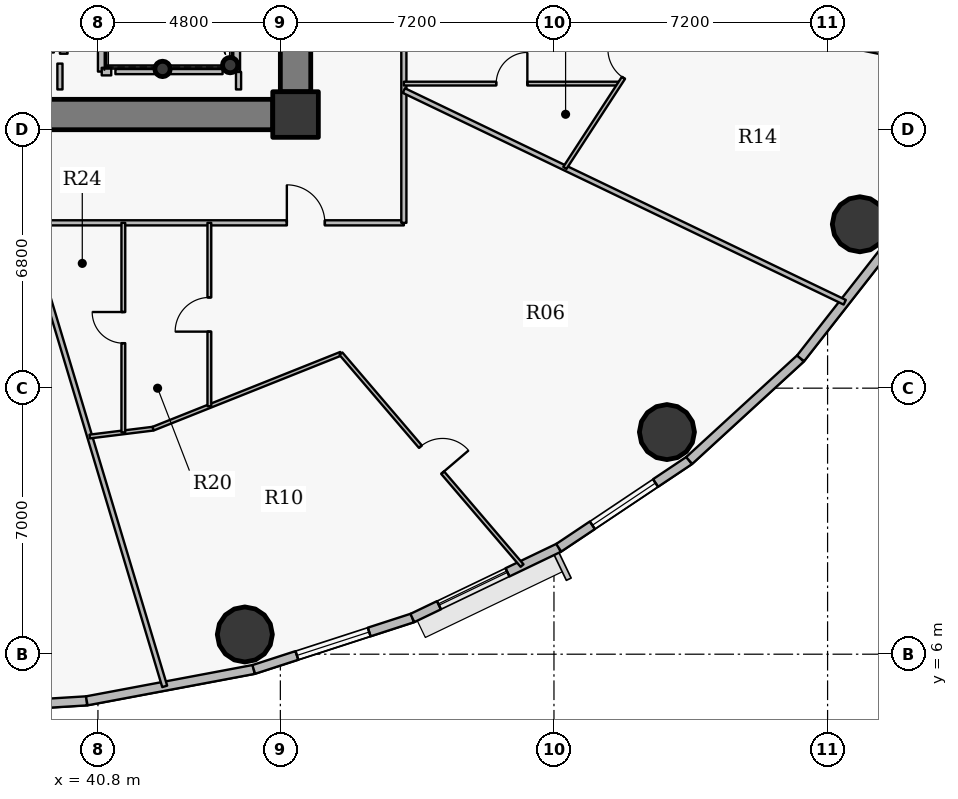
"""IFC4 building model, lengths in metres.
Left out: names, types, materials, properties, quantities, classifications, styles, units other than length and angle.
Written with IfcOpenShell. Run it as: python <this file> out.ifc"""

import sys

from ifc_helpers import new_model, si_unit, direction, frame, frame_2d, origin, origin_2d, place, context, subcontext, project, spatial, rectangle, hollow_circle, extrude, source, transform, mapped, element, fill, save


model = new_model("IFC4")
c1 = context("Model", 3, precision=1e-05, world=origin(), true_north=direction((0.0, 1.0)))
c2 = subcontext(c1, "Body", "Model", "MODEL_VIEW")
j1 = project(units=[si_unit("LENGTHUNIT", "METRE"), si_unit("PLANEANGLEUNIT", "RADIAN")], contexts=[c1])
p1 = place(None, origin())
s1 = spatial("IfcSite", under=j1, at=p1, CompositionType="ELEMENT")
p2 = place(p1, origin())
s2 = spatial("IfcBuilding", under=s1, at=p2, CompositionType="ELEMENT")
p3 = place(p2, frame((0.0, 0.0, 100.95)))
s3 = spatial("IfcBuildingStorey", under=s2, at=p3, CompositionType="ELEMENT", Elevation=100.95)
p4 = place(p3, frame((46.0, 20.2, 0.0), z_axis=(0.0, 0.0, 1.0), x_axis=(1.0, 0.0, 0.0)))
e1 = element("IfcColumn", 1, at=p4, inside=s3, PredefinedType="COLUMN", context=c2, shape_type="SweptSolid", body=[
    extrude(rectangle(XDim=1.2, YDim=1.2, at=origin_2d()), origin(), (0.0, 0.0, 1.0), 3.75),
])
for number, where, z_axis, x_axis in (
    (2, (44.28, 21.5, 0.0), (0.0, 0.0, 1.0), (1.0, 0.0, 0.0)),
    (3, (42.5, 21.4, 0.0), (0.0, 0.0, 1.0), (1.0, 0.0, 0.0)),
):
    element("IfcColumn", number, at=place(p3, frame(where, z_axis=z_axis, x_axis=x_axis)), inside=s3, PredefinedType="COLUMN", context=c2, shape_type="SweptSolid", body=[
        extrude(hollow_circle(Radius=0.203, WallThickness=0.016, at=origin_2d()), origin(), (0.0, 0.0, 1.0), 3.75),
    ])
p5 = place(p3, frame((46.0, 33.2, 0.0), z_axis=(0.0, 0.0, 1.0), x_axis=(0.0, -1.0, 0.0)))
e4 = element("IfcWall", 4, at=p5, inside=s3, PredefinedType="SHEAR", context=c2, shape_type="SweptSolid", body=[
    extrude(rectangle(XDim=12.4, YDim=0.8, at=frame_2d((6.2, 0.0))), origin(), (0.0, 0.0, 1.0), 2.95),
])
p6 = place(p5, frame((5.79, 0.0, 0.0)))
e5 = element("IfcOpeningElement", 5, at=p6, cuts=e4, PredefinedType="OPENING", context=c2, shape_type="SweptSolid", body=[
    extrude(rectangle(XDim=0.82, YDim=2.1, at=origin_2d()), frame((0.41, 0.41, 1.05), z_axis=(0.0, -1.0, 0.0), x_axis=(1.0, 0.0, 0.0)), (0.0, 0.0, 1.0), 0.82),
])
p7 = place(p3, frame((45.4, 20.2, 0.0), z_axis=(0.0, 0.0, 1.0), x_axis=(-1.0, 0.0, 0.0)))
e6 = element("IfcWall", 6, at=p7, inside=s3, PredefinedType="SHEAR", context=c2, shape_type="SweptSolid", body=[
    extrude(rectangle(XDim=18.8, YDim=0.8, at=frame_2d((9.4, 0.0))), origin(), (0.0, 0.0, 1.0), 2.95),
])
p8 = place(p7, frame((10.15, 0.0, 0.0)))
e7 = element("IfcOpeningElement", 7, at=p8, cuts=e6, PredefinedType="OPENING", context=c2, shape_type="SweptSolid", body=[
    extrude(rectangle(XDim=1.15, YDim=2.15, at=origin_2d()), frame((0.575, 0.41, 1.075), z_axis=(0.0, -1.0, 0.0), x_axis=(1.0, 0.0, 0.0)), (0.0, 0.0, 1.0), 0.82),
])
for number, where, z_axis, x_axis in (
    (8, (44.666, 6.519, 0.0), (0.0, 0.0, 1.0), (1.0, 0.0, 0.0)),
    (9, (55.773, 11.844, 0.0), (0.0, 0.0, 1.0), (1.0, 0.0, 0.0)),
    (10, (60.849, 17.312, 0.0), (0.0, 0.0, 1.0), (1.0, 0.0, 0.0)),
):
    element("IfcColumn", number, at=place(p3, frame(where, z_axis=z_axis, x_axis=x_axis)), inside=s3, PredefinedType="COLUMN", context=c2, shape_type="SweptSolid", body=[
        extrude(hollow_circle(Radius=0.725, WallThickness=0.042, at=origin_2d()), origin(), (0.0, 0.0, 1.0), 3.75),
    ])
p9 = place(p3, frame((40.506, 4.773, 0.0), z_axis=(0.0, 0.0, 1.0), x_axis=(-0.998107531589, -0.061492726276, 0.0)))
e11 = element("IfcWall", 11, at=p9, inside=s3, PredefinedType="SOLIDWALL", context=c2, shape_type="SweptSolid", body=[
    extrude(rectangle(XDim=4.514, YDim=0.24, at=frame_2d((2.257, 0.0))), origin(), (0.0, 0.0, 1.0), 3.5),
])
p10 = place(p9, frame((1.257, 0.0, 0.9)))
e12 = element("IfcOpeningElement", 12, at=p10, cuts=e11, PredefinedType="OPENING", context=c2, shape_type="SweptSolid", body=[
    extrude(rectangle(XDim=2.0, YDim=1.75, at=origin_2d()), frame((1.0, 0.13, 0.875), z_axis=(0.0, -1.0, 0.0), x_axis=(1.0, 0.0, 0.0)), (0.0, 0.0, 1.0), 0.26),
])
p11 = place(p3, frame((44.9, 5.599, 0.0), z_axis=(0.0, 0.0, 1.0), x_axis=(-0.982789252177, -0.184730305596, 0.0)))
e13 = element("IfcWall", 13, at=p11, inside=s3, PredefinedType="SOLIDWALL", context=c2, shape_type="SweptSolid", body=[
    extrude(rectangle(XDim=4.471, YDim=0.24, at=frame_2d((2.235, 0.0))), origin(), (0.0, 0.0, 1.0), 3.5),
])
p12 = place(p3, frame((49.074, 6.953, 0.0), z_axis=(0.0, 0.0, 1.0), x_axis=(-0.951211346073, -0.308540070495, 0.0)))
e14 = element("IfcWall", 14, at=p12, inside=s3, PredefinedType="SOLIDWALL", context=c2, shape_type="SweptSolid", body=[
    extrude(rectangle(XDim=4.388, YDim=0.24, at=frame_2d((2.194, 0.0))), origin(), (0.0, 0.0, 1.0), 3.5),
])
p13 = place(p12, frame((1.194, 0.0, 0.9)))
e15 = element("IfcOpeningElement", 15, at=p13, cuts=e14, PredefinedType="OPENING", context=c2, shape_type="SweptSolid", body=[
    extrude(rectangle(XDim=2.0, YDim=1.75, at=origin_2d()), frame((1.0, 0.13, 0.875), z_axis=(0.0, -1.0, 0.0), x_axis=(1.0, 0.0, 0.0)), (0.0, 0.0, 1.0), 0.26),
])
p14 = place(p3, frame((52.925, 8.801, 0.0), z_axis=(0.0, 0.0, 1.0), x_axis=(-0.901589935876, -0.432591709962, 0.0)))
e16 = element("IfcWall", 16, at=p14, inside=s3, PredefinedType="SOLIDWALL", context=c2, shape_type="SweptSolid", body=[
    extrude(rectangle(XDim=4.272, YDim=0.24, at=frame_2d((2.136, 0.0))), origin(), (0.0, 0.0, 1.0), 3.5),
])
p15 = place(p14, frame((1.495, 0.0, 0.9)))
e17 = element("IfcOpeningElement", 17, at=p15, cuts=e16, PredefinedType="OPENING", context=c2, shape_type="SweptSolid", body=[
    extrude(rectangle(XDim=2.0, YDim=1.75, at=origin_2d()), frame((1.0, 0.13, 0.875), z_axis=(0.0, -1.0, 0.0), x_axis=(1.0, 0.0, 0.0)), (0.0, 0.0, 1.0), 0.26),
])
p16 = place(p3, frame((56.358, 11.097, 0.0), z_axis=(0.0, 0.0, 1.0), x_axis=(-0.831221811447, -0.555940914284, 0.0)))
e18 = element("IfcWall", 18, at=p16, inside=s3, PredefinedType="SOLIDWALL", context=c2, shape_type="SweptSolid", body=[
    extrude(rectangle(XDim=4.13, YDim=0.24, at=frame_2d((2.065, 0.0))), origin(), (0.0, 0.0, 1.0), 3.5),
])
p17 = place(p16, frame((1.065, 0.0, 0.9)))
e19 = element("IfcOpeningElement", 19, at=p17, cuts=e18, PredefinedType="OPENING", context=c2, shape_type="SweptSolid", body=[
    extrude(rectangle(XDim=2.0, YDim=1.75, at=origin_2d()), frame((1.0, 0.13, 0.875), z_axis=(0.0, -1.0, 0.0), x_axis=(1.0, 0.0, 0.0)), (0.0, 0.0, 1.0), 0.26),
])
p18 = place(p3, frame((59.289, 13.783, 0.0), z_axis=(0.0, 0.0, 1.0), x_axis=(-0.737113356241, -0.675769117414, 0.0)))
e20 = element("IfcWall", 20, at=p18, inside=s3, PredefinedType="SOLIDWALL", context=c2, shape_type="SweptSolid", body=[
    extrude(rectangle(XDim=3.976, YDim=0.24, at=frame_2d((1.988, 0.0))), origin(), (0.0, 0.0, 1.0), 3.5),
])
p19 = place(p3, frame((61.645, 16.794, 0.0), z_axis=(0.0, 0.0, 1.0), x_axis=(-0.616272103517, -0.787533297345, 0.0)))
e21 = element("IfcWall", 21, at=p19, inside=s3, PredefinedType="SOLIDWALL", context=c2, shape_type="SweptSolid", body=[
    extrude(rectangle(XDim=3.823, YDim=0.24, at=frame_2d((1.912, 0.0))), origin(), (0.0, 0.0, 1.0), 3.5),
])
p20 = place(p3, frame((34.795, 17.35, 0.0), z_axis=(0.0, 0.0, 1.0), x_axis=(1.0, 0.0, 0.0)))
e22 = element("IfcWall", 22, at=p20, inside=s3, PredefinedType="PARTITIONING", context=c2, shape_type="SweptSolid", body=[
    extrude(rectangle(XDim=14.055, YDim=0.135, at=frame_2d((7.028, 0.0))), origin(), (0.0, 0.0, 1.0), 2.935),
])
p21 = place(p20, frame((1.571, 0.0, 0.0)))
e23 = element("IfcOpeningElement", 23, at=p21, cuts=e22, PredefinedType="OPENING", context=c2, shape_type="SweptSolid", body=[
    extrude(rectangle(XDim=1.0, YDim=2.15, at=origin_2d()), frame((0.5, 0.078, 1.075), z_axis=(0.0, -1.0, 0.0), x_axis=(1.0, 0.0, 0.0)), (0.0, 0.0, 1.0), 0.155),
])
p22 = place(p20, frame((10.976, 0.0, 0.0)))
e24 = element("IfcOpeningElement", 24, at=p22, cuts=e22, PredefinedType="OPENING", context=c2, shape_type="SweptSolid", body=[
    extrude(rectangle(XDim=1.0, YDim=2.15, at=origin_2d()), frame((0.5, 0.078, 1.075), z_axis=(0.0, -1.0, 0.0), x_axis=(1.0, 0.0, 0.0)), (0.0, 0.0, 1.0), 0.155),
])
p23 = place(p3, frame((38.896, 17.35, 0.0), z_axis=(0.0, 0.0, 1.0), x_axis=(0.287463970392, -0.957791452105, 0.0)))
e25 = element("IfcWall", 25, at=p23, inside=s3, PredefinedType="PARTITIONING", context=c2, shape_type="SweptSolid", body=[
    extrude(rectangle(XDim=12.734, YDim=0.135, at=frame_2d((6.367, 0.0))), origin(), (0.0, 0.0, 1.0), 2.935),
])
p24 = place(p3, frame((39.8, 21.9, 0.0), z_axis=(0.0, 0.0, 1.0), x_axis=(1.0, 0.0, 0.0)))
e26 = element("IfcWall", 26, at=p24, inside=s3, PredefinedType="PARTITIONING", context=c2, shape_type="SweptSolid", body=[
    extrude(rectangle(XDim=0.2, YDim=0.2, at=frame_2d((0.1, 0.0))), origin(), (0.0, 0.0, 1.0), 3.5),
])
p25 = place(p3, frame((40.584, 11.728, 0.0), z_axis=(0.0, 0.0, 1.0), x_axis=(0.992400317705, 0.123051247123, 0.0)))
e27 = element("IfcWall", 27, at=p25, inside=s3, PredefinedType="PARTITIONING", context=c2, shape_type="SweptSolid", body=[
    extrude(rectangle(XDim=1.68, YDim=0.1, at=frame_2d((0.84, 0.0))), origin(), (0.0, 0.0, 1.0), 2.935),
])
p26 = place(p3, frame((40.9, 21.33, 0.0), z_axis=(0.0, 0.0, 1.0), x_axis=(0.0, 1.0, 0.0)))
e28 = element("IfcWall", 28, at=p26, inside=s3, PredefinedType="PARTITIONING", context=c2, shape_type="SweptSolid", body=[
    extrude(rectangle(XDim=5.91, YDim=0.2, at=frame_2d((2.955, 0.0))), origin(), (0.0, 0.0, 1.0), 3.035),
])
p27 = place(p3, frame((40.9, 21.33, 0.0), z_axis=(0.0, 0.0, 1.0), x_axis=(1.0, 0.0, 0.0)))
e29 = element("IfcWall", 29, at=p27, inside=s3, PredefinedType="PARTITIONING", context=c2, shape_type="SweptSolid", body=[
    extrude(rectangle(XDim=0.25, YDim=0.2, at=frame_2d((0.125, 0.0))), origin(), (0.0, 0.0, 1.0), 3.035),
])
p28 = place(p3, frame((41.469, 11.837, 0.0), z_axis=(0.0, 0.0, 1.0), x_axis=(0.0, 1.0, 0.0)))
e30 = element("IfcWall", 30, at=p28, inside=s3, PredefinedType="PARTITIONING", context=c2, shape_type="SweptSolid", body=[
    extrude(rectangle(XDim=5.513, YDim=0.1, at=frame_2d((2.756, 0.0))), origin(), (0.0, 0.0, 1.0), 2.935),
])
p29 = place(p28, frame((2.346, 0.0, 0.0)))
e31 = element("IfcOpeningElement", 31, at=p29, cuts=e30, PredefinedType="OPENING", context=c2, shape_type="SweptSolid", body=[
    extrude(rectangle(XDim=0.82, YDim=2.1, at=origin_2d()), frame((0.41, 0.06, 1.05), z_axis=(0.0, -1.0, 0.0), x_axis=(1.0, 0.0, 0.0)), (0.0, 0.0, 1.0), 0.12),
])
p30 = place(p3, frame((42.251, 11.934, 0.0), z_axis=(0.0, 0.0, 1.0), x_axis=(0.928805351872, 0.370567967226, 0.0)))
e32 = element("IfcWall", 32, at=p30, inside=s3, PredefinedType="PARTITIONING", context=c2, shape_type="SweptSolid", body=[
    extrude(rectangle(XDim=5.322, YDim=0.1, at=frame_2d((2.661, 0.0))), origin(), (0.0, 0.0, 1.0), 2.935),
])
p31 = place(p3, frame((43.732, 12.525, 0.0), z_axis=(0.0, 0.0, 1.0), x_axis=(0.0, 1.0, 0.0)))
e33 = element("IfcWall", 33, at=p31, inside=s3, PredefinedType="PARTITIONING", context=c2, shape_type="SweptSolid", body=[
    extrude(rectangle(XDim=4.825, YDim=0.1, at=frame_2d((2.413, 0.0))), origin(), (0.0, 0.0, 1.0), 3.5),
])
p32 = place(p31, frame((1.962, 0.0, 0.0)))
e34 = element("IfcOpeningElement", 34, at=p32, cuts=e33, PredefinedType="OPENING", context=c2, shape_type="SweptSolid", body=[
    extrude(rectangle(XDim=0.9, YDim=2.1, at=origin_2d()), frame((0.45, 0.06, 1.05), z_axis=(0.0, -1.0, 0.0), x_axis=(1.0, 0.0, 0.0)), (0.0, 0.0, 1.0), 0.12),
])
p33 = place(p3, frame((44.44, 21.33, 0.0), z_axis=(0.0, 0.0, 1.0), x_axis=(0.0, 1.0, 0.0)))
e35 = element("IfcWall", 35, at=p33, inside=s3, PredefinedType="PARTITIONING", context=c2, shape_type="SweptSolid", body=[
    extrude(rectangle(XDim=8.52, YDim=0.2, at=frame_2d((4.26, 0.0))), origin(), (0.0, 0.0, 1.0), 3.5),
])
p34 = place(p3, frame((47.195, 13.906, 0.0), z_axis=(0.0, 0.0, 1.0), x_axis=(0.649828611722, -0.76008076899, 0.0)))
e36 = element("IfcWall", 36, at=p34, inside=s3, PredefinedType="PARTITIONING", context=c2, shape_type="SweptSolid", body=[
    extrude(rectangle(XDim=7.334, YDim=0.1, at=frame_2d((3.667, 0.0))), origin(), (0.0, 0.0, 1.0), 2.935),
])
p35 = place(p34, frame((3.217, 0.0, 0.0)))
e37 = element("IfcOpeningElement", 37, at=p35, cuts=e36, PredefinedType="OPENING", context=c2, shape_type="SweptSolid", body=[
    extrude(rectangle(XDim=0.9, YDim=2.1, at=origin_2d()), frame((0.45, 0.06, 1.05), z_axis=(0.0, -1.0, 0.0), x_axis=(1.0, 0.0, 0.0)), (0.0, 0.0, 1.0), 0.12),
])
p36 = place(p3, frame((48.85, 17.35, 0.0), z_axis=(0.0, 0.0, 1.0), x_axis=(0.0, 1.0, 0.0)))
e38 = element("IfcWall", 38, at=p36, inside=s3, PredefinedType="PARTITIONING", context=c2, shape_type="SweptSolid", body=[
    extrude(rectangle(XDim=19.3, YDim=0.135, at=frame_2d((9.65, 0.0))), origin(), (0.0, 0.0, 1.0), 2.935),
])
p37 = place(p36, frame((16.551, 0.0, 0.0)))
e39 = element("IfcOpeningElement", 39, at=p37, cuts=e38, PredefinedType="OPENING", context=c2, shape_type="SweptSolid", body=[
    extrude(rectangle(XDim=1.0, YDim=2.15, at=origin_2d()), frame((0.5, 0.078, 1.075), z_axis=(0.0, -1.0, 0.0), x_axis=(1.0, 0.0, 0.0)), (0.0, 0.0, 1.0), 0.155),
])
p38 = place(p36, frame((8.753, 0.0, 0.0)))
e40 = element("IfcOpeningElement", 40, at=p38, cuts=e38, PredefinedType="OPENING", context=c2, shape_type="SweptSolid", body=[
    extrude(rectangle(XDim=1.0, YDim=2.15, at=origin_2d()), frame((0.5, 0.078, 1.075), z_axis=(0.0, -1.0, 0.0), x_axis=(1.0, 0.0, 0.0)), (0.0, 0.0, 1.0), 0.155),
])
p39 = place(p3, frame((48.85, 20.83, 0.0), z_axis=(0.0, 0.0, 1.0), x_axis=(0.901472427533, -0.432836530803, 0.0)))
e41 = element("IfcWall", 41, at=p39, inside=s3, PredefinedType="PARTITIONING", context=c2, shape_type="SweptSolid", body=[
    extrude(rectangle(XDim=12.869, YDim=0.135, at=frame_2d((6.434, 0.0))), origin(), (0.0, 0.0, 1.0), 2.935),
])
p40 = place(p3, frame((48.85, 21.014, 0.0), z_axis=(0.0, 0.0, 1.0), x_axis=(1.0, 0.0, 0.0)))
e42 = element("IfcWall", 42, at=p40, inside=s3, PredefinedType="PARTITIONING", context=c2, shape_type="SweptSolid", body=[
    extrude(rectangle(XDim=5.68, YDim=0.1, at=frame_2d((2.84, 0.0))), origin(), (0.0, 0.0, 1.0), 2.935),
])
p41 = place(p40, frame((2.43, 0.0, 0.0)))
e43 = element("IfcOpeningElement", 43, at=p41, cuts=e42, PredefinedType="OPENING", context=c2, shape_type="SweptSolid", body=[
    extrude(rectangle(XDim=0.82, YDim=2.1, at=origin_2d()), frame((0.41, 0.06, 1.05), z_axis=(0.0, -1.0, 0.0), x_axis=(1.0, 0.0, 0.0)), (0.0, 0.0, 1.0), 0.12),
])
p42 = place(p3, frame((53.087, 18.796, 0.0), z_axis=(0.0, 0.0, 1.0), x_axis=(0.545403476424, 0.838173638278, 0.0)))
e44 = element("IfcWall", 44, at=p42, inside=s3, PredefinedType="PARTITIONING", context=c2, shape_type="SweptSolid", body=[
    extrude(rectangle(XDim=3.948, YDim=0.1, at=frame_2d((1.974, 0.0))), origin(), (0.0, 0.0, 1.0), 2.935),
])
p43 = place(p42, frame((2.827, 0.0, 0.0)))
e45 = element("IfcOpeningElement", 45, at=p43, cuts=e44, PredefinedType="OPENING", context=c2, shape_type="SweptSolid", body=[
    extrude(rectangle(XDim=0.9, YDim=2.1, at=origin_2d()), frame((0.45, 0.06, 1.05), z_axis=(0.0, -1.0, 0.0), x_axis=(1.0, 0.0, 0.0)), (0.0, 0.0, 1.0), 0.12),
])
p44 = place(p3, frame((55.431, 23.05, 0.0), z_axis=(0.0, 0.0, 1.0), x_axis=(0.979953651871, -0.199225601228, 0.0)))
e46 = element("IfcWall", 46, at=p44, inside=s3, PredefinedType="PARTITIONING", context=c2, shape_type="SweptSolid", body=[
    extrude(rectangle(XDim=8.513, YDim=0.1, at=frame_2d((4.257, 0.0))), origin(), (0.0, 0.0, 1.0), 2.935),
])
p45 = place(p3, frame((44.08, 21.33, 0.0), z_axis=(0.0, 0.0, 1.0), x_axis=(-1.0, 0.0, 0.0)))
e47 = element("IfcWall", 47, at=p45, inside=s3, PredefinedType="PARTITIONING", context=c2, shape_type="SweptSolid", body=[
    extrude(rectangle(XDim=2.82, YDim=0.135, at=frame_2d((1.41, 0.0))), origin(), (0.0, 0.0, 1.0), 3.035),
])
p46 = place(p3, frame((39.8, 20.86, 0.0), z_axis=(0.0, 0.0, 1.0), x_axis=(0.0, 1.0, 0.0)))
e48 = element("IfcWall", 48, at=p46, inside=s3, PredefinedType="PARTITIONING", context=c2, shape_type="SweptSolid", body=[
    extrude(rectangle(XDim=0.68, YDim=0.135, at=frame_2d((0.34, 0.0))), origin(), (0.0, 0.0, 1.0), 3.035),
])
p47 = place(p3, frame((44.5, 20.86, 0.0), z_axis=(0.0, 0.0, 1.0), x_axis=(0.0, 1.0, 0.0)))
e49 = element("IfcWall", 49, at=p47, inside=s3, PredefinedType="PARTITIONING", context=c2, shape_type="SweptSolid", body=[
    extrude(rectangle(XDim=0.46, YDim=0.135, at=frame_2d((0.23, 0.0))), origin(), (0.0, 0.0, 1.0), 3.5),
])
p48 = place(p3, frame((45.41, 19.8, 0.0), z_axis=(0.0, 0.0, 1.0), x_axis=(1.0, 0.0, 0.0)))
e50 = element("IfcWall", 50, at=p48, inside=s3, PredefinedType="PARTITIONING", context=c2, shape_type="SweptSolid", body=[
    extrude(rectangle(XDim=0.99, YDim=0.135, at=frame_2d((0.495, 0.0))), origin(), (0.0, 0.0, 1.0), 2.935),
])
p49 = place(p3, frame((46.4, 20.107, 0.0), z_axis=(0.0, 0.0, 1.0), x_axis=(0.0, 1.0, 0.0)))
e51 = element("IfcWall", 51, at=p49, inside=s3, PredefinedType="PARTITIONING", context=c2, shape_type="SweptSolid", body=[
    extrude(rectangle(XDim=0.683, YDim=0.135, at=frame_2d((0.341, 0.0))), origin(), (0.0, 0.0, 1.0), 3.5),
])
m1 = source(origin(), c2, "Body", "SweptSolid", [
    extrude(rectangle(XDim=2.0, YDim=1.75, at=origin_2d()), frame((1.0, 0.03, 0.875), z_axis=(0.0, -1.0, 0.0), x_axis=(1.0, 0.0, 0.0)), (0.0, 0.0, 1.0), 0.06),
])
p50 = place(p13, origin())
e52 = element("IfcWindow", 52, at=p50, inside=s3, PartitioningType="DOUBLE_PANEL_VERTICAL", PredefinedType="WINDOW", context=c2, shape_type="MappedRepresentation", body=[
    mapped(m1, transform((0.0, 0.0, 0.0), x_axis=(1.0, 0.0, 0.0), y_axis=(0.0, 1.0, 0.0), z_axis=(0.0, 0.0, 1.0), scale=1.0)),
])
fill(e15, e52)
p51 = place(p15, origin())
e53 = element("IfcWindow", 53, at=p51, inside=s3, PartitioningType="DOUBLE_PANEL_VERTICAL", PredefinedType="WINDOW", context=c2, shape_type="MappedRepresentation", body=[
    mapped(m1, transform((0.0, 0.0, 0.0), x_axis=(1.0, 0.0, 0.0), y_axis=(0.0, 1.0, 0.0), z_axis=(0.0, 0.0, 1.0), scale=1.0)),
])
fill(e17, e53)
p52 = place(p17, origin())
e54 = element("IfcWindow", 54, at=p52, inside=s3, PartitioningType="DOUBLE_PANEL_VERTICAL", PredefinedType="WINDOW", context=c2, shape_type="MappedRepresentation", body=[
    mapped(m1, transform((0.0, 0.0, 0.0), x_axis=(1.0, 0.0, 0.0), y_axis=(0.0, 1.0, 0.0), z_axis=(0.0, 0.0, 1.0), scale=1.0)),
])
fill(e19, e54)
m2 = source(origin(), c2, "Body", "SweptSolid", [
    extrude(rectangle(XDim=1.0, YDim=2.15, at=origin_2d()), frame((0.5, 0.025, 1.075), z_axis=(0.0, -1.0, 0.0), x_axis=(1.0, 0.0, 0.0)), (0.0, 0.0, 1.0), 0.05),
])
p53 = place(p22, origin())
e55 = element("IfcDoor", 55, at=p53, inside=s3, OperationType="SINGLE_SWING_LEFT", PredefinedType="DOOR", context=c2, shape_type="MappedRepresentation", body=[
    mapped(m2, transform((0.0, 0.0, 0.0), x_axis=(1.0, 0.0, 0.0), y_axis=(0.0, 1.0, 0.0), z_axis=(0.0, 0.0, 1.0), scale=1.0)),
])
fill(e24, e55)
m3 = source(origin(), c2, "Body", "SweptSolid", [
    extrude(rectangle(XDim=0.9, YDim=2.1, at=origin_2d()), frame((0.45, 0.025, 1.05), z_axis=(0.0, -1.0, 0.0), x_axis=(1.0, 0.0, 0.0)), (0.0, 0.0, 1.0), 0.05),
])
p54 = place(p35, origin())
e56 = element("IfcDoor", 56, at=p54, inside=s3, OperationType="SINGLE_SWING_RIGHT", PredefinedType="DOOR", context=c2, shape_type="MappedRepresentation", body=[
    mapped(m3, transform((0.0, 0.0, 0.0), x_axis=(1.0, 0.0, 0.0), y_axis=(0.0, 1.0, 0.0), z_axis=(0.0, 0.0, 1.0), scale=1.0)),
])
fill(e37, e56)
p55 = place(p32, origin())
e57 = element("IfcDoor", 57, at=p55, inside=s3, OperationType="SINGLE_SWING_LEFT", PredefinedType="DOOR", context=c2, shape_type="MappedRepresentation", body=[
    mapped(m3, transform((0.0, 0.0, 0.0), x_axis=(1.0, 0.0, 0.0), y_axis=(0.0, 1.0, 0.0), z_axis=(0.0, 0.0, 1.0), scale=1.0)),
])
fill(e34, e57)
m4 = source(origin(), c2, "Body", "SweptSolid", [
    extrude(rectangle(XDim=0.82, YDim=2.1, at=origin_2d()), frame((0.41, 0.025, 1.05), z_axis=(0.0, -1.0, 0.0), x_axis=(1.0, 0.0, 0.0)), (0.0, 0.0, 1.0), 0.05),
])
p56 = place(p29, origin())
e58 = element("IfcDoor", 58, at=p56, inside=s3, OperationType="SINGLE_SWING_RIGHT", PredefinedType="DOOR", context=c2, shape_type="MappedRepresentation", body=[
    mapped(m4, transform((0.0, 0.0, 0.0), x_axis=(1.0, 0.0, 0.0), y_axis=(0.0, 1.0, 0.0), z_axis=(0.0, 0.0, 1.0), scale=1.0)),
])
fill(e31, e58)
p57 = place(p43, origin())
e59 = element("IfcDoor", 59, at=p57, inside=s3, OperationType="SINGLE_SWING_RIGHT", PredefinedType="DOOR", context=c2, shape_type="MappedRepresentation", body=[
    mapped(m3, transform((0.0, 0.0, 0.0), x_axis=(1.0, 0.0, 0.0), y_axis=(0.0, 1.0, 0.0), z_axis=(0.0, 0.0, 1.0), scale=1.0)),
])
fill(e45, e59)
p58 = place(p41, origin())
e60 = element("IfcDoor", 60, at=p58, inside=s3, OperationType="SINGLE_SWING_RIGHT", PredefinedType="DOOR", context=c2, shape_type="MappedRepresentation", body=[
    mapped(m4, transform((0.0, 0.0, 0.0), x_axis=(1.0, 0.0, 0.0), y_axis=(0.0, 1.0, 0.0), z_axis=(0.0, 0.0, 1.0), scale=1.0)),
])
fill(e43, e60)
save(model, sys.argv[1])
